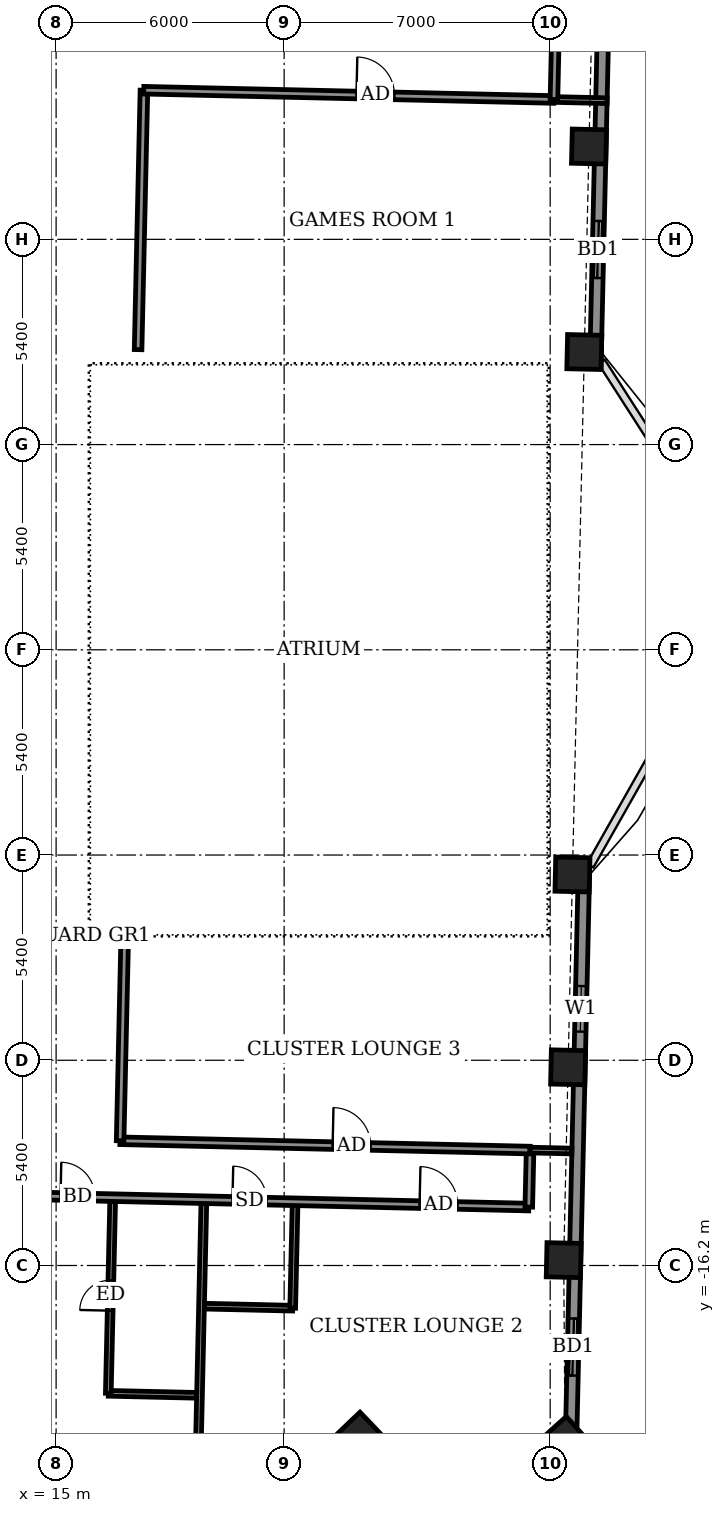
"""IFC4 building model, lengths in metres.
Left out: names, types, materials, properties, quantities, classifications, styles, units other than length and angle.
Written with IfcOpenShell. Run it as: python <this file> out.ifc"""

import sys

from ifc_helpers import new_model, si_unit, direction, frame, frame_2d, origin, origin_2d, place, context, subcontext, project, spatial, rectangle, extrude, element, fill, save


model = new_model("IFC4")
c1 = context("Model", 3, precision=1e-05, world=origin(), true_north=direction((0.0, 1.0)))
c2 = subcontext(c1, "Body", "Model", "MODEL_VIEW")
j1 = project(units=[si_unit("LENGTHUNIT", "METRE"), si_unit("PLANEANGLEUNIT", "RADIAN")], contexts=[c1])
p1 = place(None, origin())
s1 = spatial("IfcSite", under=j1, at=p1, CompositionType="ELEMENT")
p2 = place(p1, origin())
s2 = spatial("IfcBuilding", under=s1, at=p2, CompositionType="ELEMENT")
p3 = place(p2, frame((0.0, 0.0, 313.3)))
s3 = spatial("IfcBuildingStorey", under=s2, at=p3, CompositionType="ELEMENT", Elevation=313.3)
for number, where, z_axis, x_axis in (
    (1, (22.981, -20.696, -0.55), (0.0, 0.0, 1.0), (0.723, 0.691, 0.0)),
    (2, (28.39, -20.808, -0.55), (0.0, 0.0, 1.0), (0.744, 0.668, 0.0)),
    (3, (28.356, -16.059, -0.55), (0.0, 0.0, 1.0), (0.023, 1.0, 0.0)),
    (4, (28.471, -10.986, -0.55), (0.0, 0.0, 1.0), (0.023, 1.0, 0.0)),
    (5, (28.586, -5.912, -0.55), (0.0, 0.0, 1.0), (0.023, 1.0, 0.0)),
    (6, (28.898, 7.835, -0.55), (0.0, 0.0, 1.0), (0.023, 1.0, 0.0)),
    (7, (29.021, 13.242, -0.55), (0.0, 0.0, 1.0), (0.023, 1.0, 0.0)),
):
    element("IfcColumn", number, at=place(p3, frame(where, z_axis=z_axis, x_axis=x_axis)), inside=s3, PredefinedType="COLUMN", context=c2, shape_type="SweptSolid", body=[
        extrude(rectangle(XDim=0.9, YDim=0.9, at=origin_2d()), origin(), (0.0, 0.0, 1.0), 3.6),
    ])
p4 = place(p3, frame((28.544, -20.99, 0.0), z_axis=(0.0, 0.0, 1.0), x_axis=(0.02271281838, 0.999742030667, 0.0)))
e8 = element("IfcWall", 8, at=p4, inside=s3, PredefinedType="SOLIDWALL", context=c2, shape_type="SweptSolid", body=[
    extrude(rectangle(XDim=15.5, YDim=0.3, at=frame_2d((7.75, 0.0))), origin(), (0.0, 0.0, 1.0), 2.55),
])
p5 = place(p4, frame((1.895, 0.0, 0.0)))
e9 = element("IfcOpeningElement", 9, at=p5, cuts=e8, PredefinedType="OPENING", context=c2, shape_type="SweptSolid", body=[
    extrude(rectangle(XDim=1.5, YDim=2.4, at=frame_2d((0.75, 1.2))), frame((0.0, 0.16, 0.0), z_axis=(0.0, -1.0, 0.0), x_axis=(1.0, 0.0, 0.0)), (0.0, 0.0, 1.0), 0.32),
])
p6 = place(p4, frame((10.946, 0.0, 0.9)))
e10 = element("IfcOpeningElement", 10, at=p6, cuts=e8, PredefinedType="OPENING", context=c2, shape_type="SweptSolid", body=[
    extrude(rectangle(XDim=1.2, YDim=1.5, at=frame_2d((0.6, 0.75))), frame((0.0, 0.16, 0.0), z_axis=(0.0, -1.0, 0.0), x_axis=(1.0, 0.0, 0.0)), (0.0, 0.0, 1.0), 0.32),
])
p7 = place(p3, frame((29.188, 7.404, 0.0), z_axis=(0.0, 0.0, 1.0), x_axis=(0.022728463996, 0.999741675096, 0.0)))
e11 = element("IfcWall", 11, at=p7, inside=s3, PredefinedType="SOLIDWALL", context=c2, shape_type="SweptSolid", body=[
    extrude(rectangle(XDim=16.499, YDim=0.3, at=frame_2d((8.25, 0.0))), origin(), (0.0, 0.0, 1.0), 2.55),
])
p8 = place(p7, frame((2.379, 0.0, 0.0)))
e12 = element("IfcOpeningElement", 12, at=p8, cuts=e11, PredefinedType="OPENING", context=c2, shape_type="SweptSolid", body=[
    extrude(rectangle(XDim=1.5, YDim=2.4, at=frame_2d((0.75, 1.2))), frame((0.0, 0.16, 0.0), z_axis=(0.0, -1.0, 0.0), x_axis=(1.0, 0.0, 0.0)), (0.0, 0.0, 1.0), 0.32),
])
p9 = place(p7, frame((12.511, 0.0, 0.9)))
e13 = element("IfcOpeningElement", 13, at=p9, cuts=e11, PredefinedType="OPENING", context=c2, shape_type="SweptSolid", body=[
    extrude(rectangle(XDim=2.4, YDim=1.5, at=frame_2d((1.2, 0.75))), frame((0.0, 0.16, 0.0), z_axis=(0.0, -1.0, 0.0), x_axis=(1.0, 0.0, 0.0)), (0.0, 0.0, 1.0), 0.32),
])
p10 = place(p3, frame((18.628, -26.016, 0.0), z_axis=(0.0, 0.0, 1.0), x_axis=(0.022623082162, 0.999744065325, 0.0)))
e14 = element("IfcWall", 14, at=p10, inside=s3, PredefinedType="PARTITIONING", context=c2, shape_type="SweptSolid", body=[
    extrude(rectangle(XDim=11.45, YDim=0.15, at=frame_2d((5.725, 0.0))), origin(), (0.0, 0.0, 1.0), 2.5),
])
p11 = place(p3, frame((16.373, -19.563, 0.0), z_axis=(0.0, 0.0, 1.0), x_axis=(0.999740478815, -0.022781023197, 0.0)))
e15 = element("IfcWall", 15, at=p11, inside=s3, PredefinedType="PARTITIONING", context=c2, shape_type="SweptSolid", body=[
    extrude(rectangle(XDim=2.325, YDim=0.15, at=frame_2d((1.163, 0.0))), origin(), (0.0, 0.0, 1.0), 3.05),
])
p12 = place(p3, frame((16.373, -19.563, 0.0), z_axis=(0.0, 0.0, 1.0), x_axis=(0.022773025649, 0.999740661023, 0.0)))
e16 = element("IfcWall", 16, at=p12, inside=s3, PredefinedType="PARTITIONING", context=c2, shape_type="SweptSolid", body=[
    extrude(rectangle(XDim=5.049, YDim=0.15, at=frame_2d((2.525, 0.0))), origin(), (0.0, 0.0, 1.0), 3.05),
])
p13 = place(p12, frame((2.175, 0.0, 0.0)))
e17 = element("IfcOpeningElement", 17, at=p13, cuts=e16, PredefinedType="OPENING", context=c2, shape_type="SweptSolid", body=[
    extrude(rectangle(XDim=0.8, YDim=2.1, at=frame_2d((0.4, 1.05))), frame((0.0, 0.085, 0.0), z_axis=(0.0, -1.0, 0.0), x_axis=(1.0, 0.0, 0.0)), (0.0, 0.0, 1.0), 0.17),
])
p14 = place(p3, frame((18.901, -17.27, 0.0), z_axis=(0.0, 0.0, 1.0), x_axis=(0.99974031529, -0.022788198363, 0.0)))
e18 = element("IfcWall", 18, at=p14, inside=s3, PredefinedType="PARTITIONING", context=c2, shape_type="SweptSolid", body=[
    extrude(rectangle(XDim=2.325, YDim=0.15, at=frame_2d((1.162, 0.0))), origin(), (0.0, 0.0, 1.0), 3.05),
])
p15 = place(p3, frame((21.225, -17.323, 0.0), z_axis=(0.0, 0.0, 1.0), x_axis=(0.022961663075, 0.999736346258, 0.0)))
e19 = element("IfcWall", 19, at=p15, inside=s3, PredefinedType="PARTITIONING", context=c2, shape_type="SweptSolid", body=[
    extrude(rectangle(XDim=2.701, YDim=0.15, at=frame_2d((1.35, 0.0))), origin(), (0.0, 0.0, 1.0), 3.05),
])
p16 = place(p3, frame((-31.347, -13.329, 0.0), z_axis=(0.0, 0.0, 1.0), x_axis=(0.999742613079, -0.022687168058, 0.0)))
e20 = element("IfcWall", 20, at=p16, inside=s3, PredefinedType="PARTITIONING", context=c2, shape_type="SweptSolid", body=[
    extrude(rectangle(XDim=58.799, YDim=0.2, at=frame_2d((29.399, 0.0))), origin(), (0.0, 0.0, 1.0), 3.05),
])
p17 = place(p16, frame((1.35, 0.0, 0.0)))
e21 = element("IfcOpeningElement", 21, at=p17, cuts=e20, PredefinedType="OPENING", context=c2, shape_type="SweptSolid", body=[
    extrude(rectangle(XDim=1.0, YDim=2.1, at=frame_2d((0.5, 1.05))), frame((0.0, 0.11, 0.0), z_axis=(0.0, -1.0, 0.0), x_axis=(1.0, 0.0, 0.0)), (0.0, 0.0, 1.0), 0.22),
])
p18 = place(p16, frame((5.95, 0.0, 0.0)))
e22 = element("IfcOpeningElement", 22, at=p18, cuts=e20, PredefinedType="OPENING", context=c2, shape_type="SweptSolid", body=[
    extrude(rectangle(XDim=0.9, YDim=2.1, at=frame_2d((0.45, 1.05))), frame((0.0, 0.11, 0.0), z_axis=(0.0, -1.0, 0.0), x_axis=(1.0, 0.0, 0.0)), (0.0, 0.0, 1.0), 0.22),
])
p19 = place(p16, frame((10.575, 0.0, 0.0)))
e23 = element("IfcOpeningElement", 23, at=p19, cuts=e20, PredefinedType="OPENING", context=c2, shape_type="SweptSolid", body=[
    extrude(rectangle(XDim=0.9, YDim=2.1, at=frame_2d((0.45, 1.05))), frame((0.0, 0.11, 0.0), z_axis=(0.0, -1.0, 0.0), x_axis=(1.0, 0.0, 0.0)), (0.0, 0.0, 1.0), 0.22),
])
p20 = place(p16, frame((12.425, 0.0, 0.0)))
e24 = element("IfcOpeningElement", 24, at=p20, cuts=e20, PredefinedType="OPENING", context=c2, shape_type="SweptSolid", body=[
    extrude(rectangle(XDim=0.9, YDim=2.1, at=frame_2d((0.45, 1.05))), frame((0.0, 0.11, 0.0), z_axis=(0.0, -1.0, 0.0), x_axis=(1.0, 0.0, 0.0)), (0.0, 0.0, 1.0), 0.22),
])
p21 = place(p16, frame((19.075, 0.0, 0.0)))
e25 = element("IfcOpeningElement", 25, at=p21, cuts=e20, PredefinedType="OPENING", context=c2, shape_type="SweptSolid", body=[
    extrude(rectangle(XDim=0.9, YDim=2.1, at=frame_2d((0.45, 1.05))), frame((0.0, 0.11, 0.0), z_axis=(0.0, -1.0, 0.0), x_axis=(1.0, 0.0, 0.0)), (0.0, 0.0, 1.0), 0.22),
])
p22 = place(p16, frame((20.95, 0.0, 0.0)))
e26 = element("IfcOpeningElement", 26, at=p22, cuts=e20, PredefinedType="OPENING", context=c2, shape_type="SweptSolid", body=[
    extrude(rectangle(XDim=0.9, YDim=2.1, at=frame_2d((0.45, 1.05))), frame((0.0, 0.11, 0.0), z_axis=(0.0, -1.0, 0.0), x_axis=(1.0, 0.0, 0.0)), (0.0, 0.0, 1.0), 0.22),
])
p23 = place(p16, frame((27.625, 0.0, 0.0)))
e27 = element("IfcOpeningElement", 27, at=p23, cuts=e20, PredefinedType="OPENING", context=c2, shape_type="SweptSolid", body=[
    extrude(rectangle(XDim=0.9, YDim=2.1, at=frame_2d((0.45, 1.05))), frame((0.0, 0.11, 0.0), z_axis=(0.0, -1.0, 0.0), x_axis=(1.0, 0.0, 0.0)), (0.0, 0.0, 1.0), 0.22),
])
p24 = place(p16, frame((29.475, 0.0, 0.0)))
e28 = element("IfcOpeningElement", 28, at=p24, cuts=e20, PredefinedType="OPENING", context=c2, shape_type="SweptSolid", body=[
    extrude(rectangle(XDim=0.9, YDim=2.1, at=frame_2d((0.45, 1.05))), frame((0.0, 0.11, 0.0), z_axis=(0.0, -1.0, 0.0), x_axis=(1.0, 0.0, 0.0)), (0.0, 0.0, 1.0), 0.22),
])
p25 = place(p16, frame((36.125, 0.0, 0.0)))
e29 = element("IfcOpeningElement", 29, at=p25, cuts=e20, PredefinedType="OPENING", context=c2, shape_type="SweptSolid", body=[
    extrude(rectangle(XDim=0.9, YDim=2.1, at=frame_2d((0.45, 1.05))), frame((0.0, 0.11, 0.0), z_axis=(0.0, -1.0, 0.0), x_axis=(1.0, 0.0, 0.0)), (0.0, 0.0, 1.0), 0.22),
])
p26 = place(p16, frame((37.95, 0.0, 0.0)))
e30 = element("IfcOpeningElement", 30, at=p26, cuts=e20, PredefinedType="OPENING", context=c2, shape_type="SweptSolid", body=[
    extrude(rectangle(XDim=0.9, YDim=2.1, at=frame_2d((0.45, 1.05))), frame((0.0, 0.11, 0.0), z_axis=(0.0, -1.0, 0.0), x_axis=(1.0, 0.0, 0.0)), (0.0, 0.0, 1.0), 0.22),
])
p27 = place(p16, frame((44.6, 0.0, 0.0)))
e31 = element("IfcOpeningElement", 31, at=p27, cuts=e20, PredefinedType="OPENING", context=c2, shape_type="SweptSolid", body=[
    extrude(rectangle(XDim=0.9, YDim=2.1, at=frame_2d((0.45, 1.05))), frame((0.0, 0.11, 0.0), z_axis=(0.0, -1.0, 0.0), x_axis=(1.0, 0.0, 0.0)), (0.0, 0.0, 1.0), 0.22),
])
p28 = place(p16, frame((46.475, 0.0, 0.0)))
e32 = element("IfcOpeningElement", 32, at=p28, cuts=e20, PredefinedType="OPENING", context=c2, shape_type="SweptSolid", body=[
    extrude(rectangle(XDim=0.9, YDim=2.1, at=frame_2d((0.45, 1.05))), frame((0.0, 0.11, 0.0), z_axis=(0.0, -1.0, 0.0), x_axis=(1.0, 0.0, 0.0)), (0.0, 0.0, 1.0), 0.22),
])
p29 = place(p16, frame((55.925, 0.0, 0.0)))
e33 = element("IfcOpeningElement", 33, at=p29, cuts=e20, PredefinedType="OPENING", context=c2, shape_type="SweptSolid", body=[
    extrude(rectangle(XDim=1.0, YDim=2.1, at=frame_2d((0.5, 1.05))), frame((0.0, 0.11, 0.0), z_axis=(0.0, -1.0, 0.0), x_axis=(1.0, 0.0, 0.0)), (0.0, 0.0, 1.0), 0.22),
])
p30 = place(p16, frame((51.0, 0.0, 0.0)))
e34 = element("IfcOpeningElement", 34, at=p30, cuts=e20, PredefinedType="OPENING", context=c2, shape_type="SweptSolid", body=[
    extrude(rectangle(XDim=0.9, YDim=2.1, at=frame_2d((0.45, 1.05))), frame((0.0, 0.11, 0.0), z_axis=(0.0, -1.0, 0.0), x_axis=(1.0, 0.0, 0.0)), (0.0, 0.0, 1.0), 0.22),
])
p31 = place(p3, frame((27.437, -14.663, 0.0), z_axis=(0.0, 0.0, 1.0), x_axis=(0.022617910375, 0.999744182344, 0.0)))
e35 = element("IfcWall", 35, at=p31, inside=s3, PredefinedType="PARTITIONING", context=c2, shape_type="SweptSolid", body=[
    extrude(rectangle(XDim=1.5, YDim=0.2, at=frame_2d((0.75, 0.0))), origin(), (0.0, 0.0, 1.0), 3.05),
])
p32 = place(p3, frame((16.679, -12.918, 0.0), z_axis=(0.0, 0.0, 1.0), x_axis=(0.999742162372, -0.022707020428, 0.0)))
e36 = element("IfcWall", 36, at=p32, inside=s3, PredefinedType="PARTITIONING", context=c2, shape_type="SweptSolid", body=[
    extrude(rectangle(XDim=10.795, YDim=0.2, at=frame_2d((5.397, 0.0))), origin(), (0.0, 0.0, 1.0), 3.05),
])
p33 = place(p32, frame((5.598, 0.0, 0.0)))
e37 = element("IfcOpeningElement", 37, at=p33, cuts=e36, PredefinedType="OPENING", context=c2, shape_type="SweptSolid", body=[
    extrude(rectangle(XDim=1.0, YDim=2.1, at=frame_2d((0.5, 1.05))), frame((0.0, 0.11, 0.0), z_axis=(0.0, -1.0, 0.0), x_axis=(1.0, 0.0, 0.0)), (0.0, 0.0, 1.0), 0.22),
])
p34 = place(p3, frame((16.684, -12.919, 0.0), z_axis=(0.0, 0.0, 1.0), x_axis=(0.022667483124, 0.999743059595, 0.0)))
e38 = element("IfcWall", 38, at=p34, inside=s3, PredefinedType="PARTITIONING", context=c2, shape_type="SweptSolid", body=[
    extrude(rectangle(XDim=5.245, YDim=0.2, at=frame_2d((2.623, 0.0))), origin(), (0.0, 0.0, 1.0), 3.05),
])
p35 = place(p3, frame((27.467, -13.163, 0.0), z_axis=(0.0, 0.0, 1.0), x_axis=(0.999745701647, -0.022550654924, 0.0)))
e39 = element("IfcWall", 39, at=p35, inside=s3, PredefinedType="PARTITIONING", context=c2, shape_type="SweptSolid", body=[
    extrude(rectangle(XDim=1.104, YDim=0.15, at=frame_2d((0.552, 0.0))), origin(), (0.0, 0.0, 1.0), 2.55),
])
p36 = place(p3, frame((17.157, 7.898, 0.0), z_axis=(0.0, 0.0, 1.0), x_axis=(0.022562209343, 0.999745440955, 0.0)))
e40 = element("IfcWall", 40, at=p36, inside=s3, PredefinedType="PARTITIONING", context=c2, shape_type="SweptSolid", body=[
    extrude(rectangle(XDim=6.828, YDim=0.2, at=frame_2d((3.414, 0.0))), origin(), (0.0, 0.0, 1.0), 3.05),
])
p37 = place(p3, frame((17.306, 14.724, 0.0), z_axis=(0.0, 0.0, 1.0), x_axis=(0.999744269809, -0.022614043969, 0.0)))
e41 = element("IfcWall", 41, at=p37, inside=s3, PredefinedType="PARTITIONING", context=c2, shape_type="SweptSolid", body=[
    extrude(rectangle(XDim=10.796, YDim=0.2, at=frame_2d((5.398, 0.0))), origin(), (0.0, 0.0, 1.0), 3.05),
])
p38 = place(p37, frame((5.598, 0.0, 0.0)))
e42 = element("IfcOpeningElement", 42, at=p38, cuts=e41, PredefinedType="OPENING", context=c2, shape_type="SweptSolid", body=[
    extrude(rectangle(XDim=1.0, YDim=2.1, at=frame_2d((0.5, 1.05))), frame((0.0, 0.11, 0.0), z_axis=(0.0, -1.0, 0.0), x_axis=(1.0, 0.0, 0.0)), (0.0, 0.0, 1.0), 0.22),
])
p39 = place(p3, frame((28.099, 14.48, 0.0), z_axis=(0.0, 0.0, 1.0), x_axis=(0.999738763928, -0.022856156732, 0.0)))
e43 = element("IfcWall", 43, at=p39, inside=s3, PredefinedType="PARTITIONING", context=c2, shape_type="SweptSolid", body=[
    extrude(rectangle(XDim=1.399, YDim=0.15, at=frame_2d((0.7, 0.0))), origin(), (0.0, 0.0, 1.0), 2.55),
])
p40 = place(p3, frame((28.099, 14.48, 0.0), z_axis=(0.0, 0.0, 1.0), x_axis=(0.022632637625, 0.99974384905, 0.0)))
e44 = element("IfcWall", 44, at=p40, inside=s3, PredefinedType="PARTITIONING", context=c2, shape_type="SweptSolid", body=[
    extrude(rectangle(XDim=1.5, YDim=0.2, at=frame_2d((0.75, 0.0))), origin(), (0.0, 0.0, 1.0), 3.05),
])
p41 = place(p5, origin())
e45 = element("IfcDoor", 45, at=p41, inside=s3, OperationType="SLIDING_TO_LEFT", PredefinedType="DOOR", context=c2, shape_type="SweptSolid", body=[
    extrude(rectangle(XDim=1.5, YDim=2.4, at=frame_2d((0.75, 1.2))), frame((0.0, 0.025, 0.0), z_axis=(0.0, -1.0, 0.0), x_axis=(1.0, 0.0, 0.0)), (0.0, 0.0, 1.0), 0.05),
])
fill(e9, e45)
p42 = place(p6, origin())
e46 = element("IfcWindow", 46, at=p42, inside=s3, PartitioningType="SINGLE_PANEL", PredefinedType="WINDOW", context=c2, shape_type="SweptSolid", body=[
    extrude(rectangle(XDim=1.2, YDim=1.5, at=frame_2d((0.6, 0.75))), frame((0.0, 0.03, 0.0), z_axis=(0.0, -1.0, 0.0), x_axis=(1.0, 0.0, 0.0)), (0.0, 0.0, 1.0), 0.06),
])
fill(e10, e46)
p43 = place(p8, origin())
e47 = element("IfcDoor", 47, at=p43, inside=s3, OperationType="SLIDING_TO_LEFT", PredefinedType="DOOR", context=c2, shape_type="SweptSolid", body=[
    extrude(rectangle(XDim=1.5, YDim=2.4, at=frame_2d((0.75, 1.2))), frame((0.0, 0.025, 0.0), z_axis=(0.0, -1.0, 0.0), x_axis=(1.0, 0.0, 0.0)), (0.0, 0.0, 1.0), 0.05),
])
fill(e12, e47)
p44 = place(p28, origin())
e48 = element("IfcDoor", 48, at=p44, inside=s3, OperationType="SINGLE_SWING_RIGHT", PredefinedType="DOOR", context=c2, shape_type="SweptSolid", body=[
    extrude(rectangle(XDim=0.9, YDim=2.1, at=frame_2d((0.45, 1.05))), frame((0.0, 0.025, 0.0), z_axis=(0.0, -1.0, 0.0), x_axis=(1.0, 0.0, 0.0)), (0.0, 0.0, 1.0), 0.05),
])
fill(e32, e48)
p45 = place(p13, origin())
e49 = element("IfcDoor", 49, at=p45, inside=s3, OperationType="SINGLE_SWING_RIGHT", PredefinedType="DOOR", context=c2, shape_type="SweptSolid", body=[
    extrude(rectangle(XDim=0.8, YDim=2.1, at=frame_2d((0.4, 1.05))), frame((0.0, 0.025, 0.0), z_axis=(0.0, -1.0, 0.0), x_axis=(1.0, 0.0, 0.0)), (0.0, 0.0, 1.0), 0.05),
])
fill(e17, e49)
p46 = place(p29, origin())
e50 = element("IfcDoor", 50, at=p46, inside=s3, OperationType="SINGLE_SWING_RIGHT", PredefinedType="DOOR", context=c2, shape_type="SweptSolid", body=[
    extrude(rectangle(XDim=1.0, YDim=2.1, at=frame_2d((0.5, 1.05))), frame((0.0, 0.025, 0.0), z_axis=(0.0, -1.0, 0.0), x_axis=(1.0, 0.0, 0.0)), (0.0, 0.0, 1.0), 0.05),
])
fill(e33, e50)
p47 = place(p30, origin())
e51 = element("IfcDoor", 51, at=p47, inside=s3, OperationType="SINGLE_SWING_RIGHT", PredefinedType="DOOR", context=c2, shape_type="SweptSolid", body=[
    extrude(rectangle(XDim=0.9, YDim=2.1, at=frame_2d((0.45, 1.05))), frame((0.0, 0.025, 0.0), z_axis=(0.0, -1.0, 0.0), x_axis=(1.0, 0.0, 0.0)), (0.0, 0.0, 1.0), 0.05),
])
fill(e34, e51)
p48 = place(p33, origin())
e52 = element("IfcDoor", 52, at=p48, inside=s3, OperationType="SINGLE_SWING_LEFT", PredefinedType="DOOR", context=c2, shape_type="SweptSolid", body=[
    extrude(rectangle(XDim=1.0, YDim=2.1, at=frame_2d((0.5, 1.05))), frame((0.0, 0.025, 0.0), z_axis=(0.0, -1.0, 0.0), x_axis=(1.0, 0.0, 0.0)), (0.0, 0.0, 1.0), 0.05),
])
fill(e37, e52)
p49 = place(p38, origin())
e53 = element("IfcDoor", 53, at=p49, inside=s3, OperationType="SINGLE_SWING_RIGHT", PredefinedType="DOOR", context=c2, shape_type="SweptSolid", body=[
    extrude(rectangle(XDim=1.0, YDim=2.1, at=frame_2d((0.5, 1.05))), frame((0.0, 0.025, 0.0), z_axis=(0.0, -1.0, 0.0), x_axis=(1.0, 0.0, 0.0)), (0.0, 0.0, 1.0), 0.05),
])
fill(e42, e53)
save(model, sys.argv[1])
